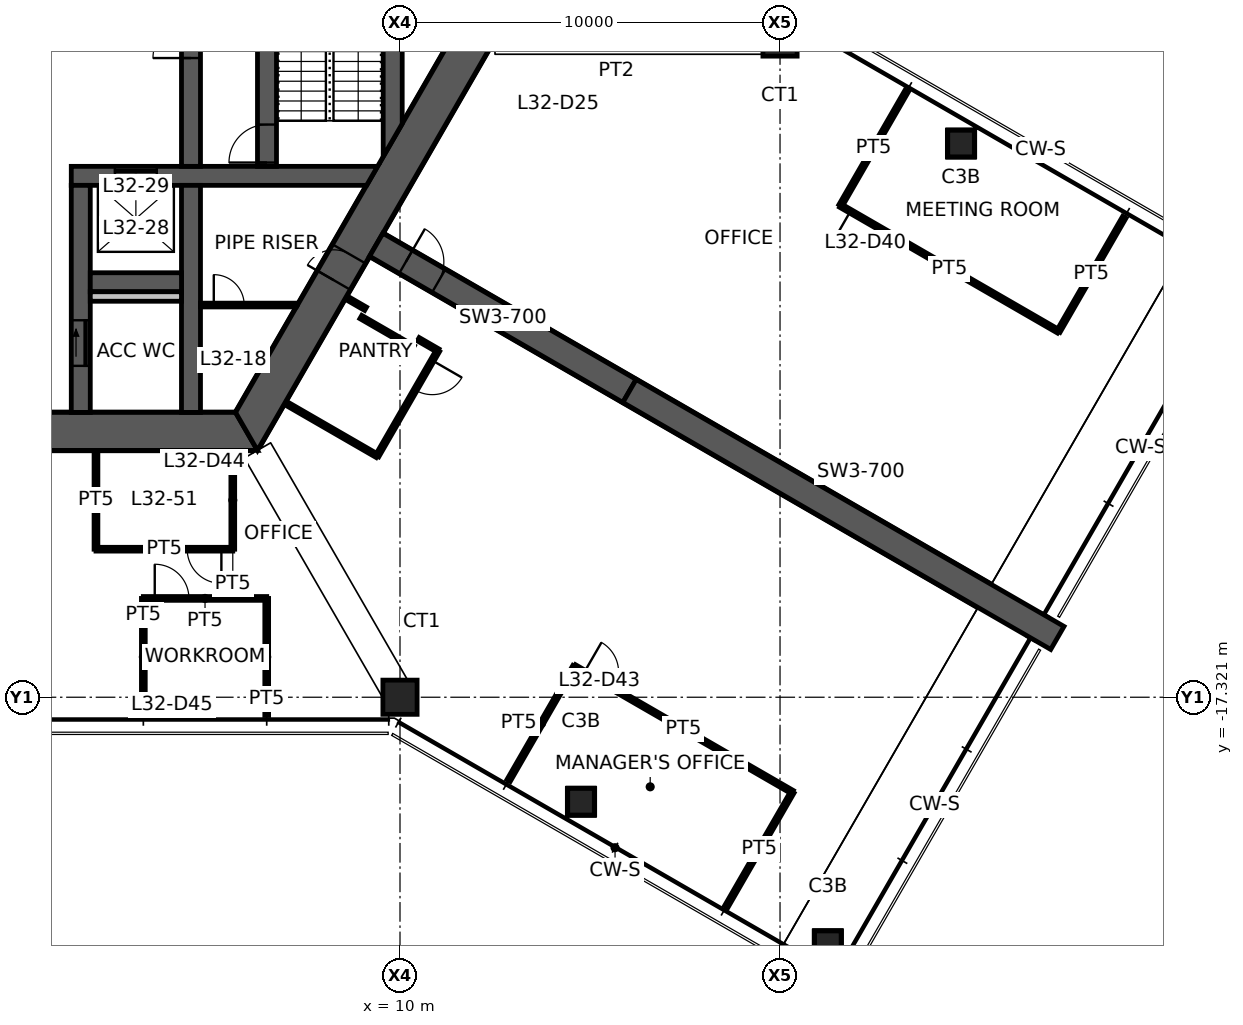
"""IFC4 building model, lengths in metres.
Left out: names, types, materials, properties, quantities, classifications, styles, units other than length and angle.
Written with IfcOpenShell. Run it as: python <this file> out.ifc"""

import sys

from ifc_helpers import new_model, si_unit, direction, frame, frame_2d, origin, origin_2d, place, context, subcontext, project, spatial, polyline, rectangle, hollow_rectangle, outline, extrude, element, fill, save


model = new_model("IFC4")
c1 = context("Model", 3, precision=1e-05, world=origin(), true_north=direction((0.0, 1.0)))
c2 = subcontext(c1, "Body", "Model", "MODEL_VIEW")
j1 = project(units=[si_unit("LENGTHUNIT", "METRE"), si_unit("PLANEANGLEUNIT", "RADIAN")], contexts=[c1])
p1 = place(None, origin())
s1 = spatial("IfcSite", under=j1, at=p1, CompositionType="ELEMENT")
p2 = place(p1, origin())
s2 = spatial("IfcBuilding", under=s1, at=p2, CompositionType="ELEMENT")
p3 = place(p2, frame((0.0, 0.0, 128.6)))
s3 = spatial("IfcBuildingStorey", under=s2, at=p3, CompositionType="ELEMENT", Elevation=128.6)
for number, where, z_axis, x_axis in (
    (1, (20.0, 0.0, 0.0), (0.0, 0.0, 1.0), (1.0, 0.0, 0.0)),
    (2, (10.0, -17.321, 0.0), (0.0, 0.0, 1.0), (1.0, 0.0, 0.0)),
):
    element("IfcColumn", number, at=place(p3, frame(where, z_axis=z_axis, x_axis=x_axis)), inside=s3, PredefinedType="COLUMN", context=c2, shape_type="SweptSolid", body=[
        extrude(hollow_rectangle(XDim=0.9, YDim=0.9, WallThickness=0.07, at=origin_2d()), origin(), (0.0, 0.0, 1.0), 4.5),
    ])
for number, where, z_axis, x_axis in (
    (3, (14.763, -20.071, 0.0), (0.0, 0.0, 1.0), (1.0, 0.0, 0.0)),
    (4, (21.258, -23.821, 0.0), (0.0, 0.0, 1.0), (1.0, 0.0, 0.0)),
    (5, (24.763, -2.75, 0.0), (0.0, 0.0, 1.0), (1.0, 0.0, 0.0)),
):
    element("IfcColumn", number, at=place(p3, frame(where, z_axis=z_axis, x_axis=x_axis)), inside=s3, PredefinedType="COLUMN", context=c2, shape_type="SweptSolid", body=[
        extrude(hollow_rectangle(XDim=0.7, YDim=0.7, WallThickness=0.036, at=origin_2d()), origin(), (0.0, 0.0, 1.0), 4.5),
    ])
p4 = place(p3, frame((-5.961, -10.325, 0.0), z_axis=(0.0, 0.0, 1.0), x_axis=(1.0, 0.0, 0.0)))
e6 = element("IfcWall", 6, at=p4, inside=s3, PredefinedType="SHEAR", context=c2, shape_type="SweptSolid", body=[
    extrude(outline(polyline([(-0.289, -0.5), (5.461, -0.5), (6.461, -0.5), (12.211, -0.5), (11.634, 0.5), (6.461, 0.5), (5.461, 0.5), (0.289, 0.5), (-0.289, -0.5)])), origin(), (0.0, 0.0, 1.0), 4.5),
])
p5 = place(p4, frame((5.461, 0.0, 0.0)))
e7 = element("IfcOpeningElement", 7, at=p5, cuts=e6, PredefinedType="OPENING", context=c2, shape_type="SweptSolid", body=[
    extrude(rectangle(XDim=1.0, YDim=2.1, at=frame_2d((0.5, 1.05))), frame((0.0, 0.51, 0.0), z_axis=(0.0, -1.0, 0.0), x_axis=(1.0, 0.0, 0.0)), (0.0, 0.0, 1.0), 1.02),
])
p6 = place(p3, frame((5.961, -10.325, 0.0), z_axis=(0.0, 0.0, 1.0), x_axis=(0.500004296715, 0.866022923061, 0.0)))
e8 = element("IfcWall", 8, at=p6, inside=s3, PredefinedType="SHEAR", context=c2, shape_type="SweptSolid", body=[
    extrude(outline(polyline([(-0.289, -0.5), (4.594, -0.5), (5.394, -0.5), (12.211, -0.5), (11.634, 0.5), (5.394, 0.5), (4.594, 0.5), (0.289, 0.5), (-0.289, -0.5)])), origin(), (0.0, 0.0, 1.0), 4.5),
])
p7 = place(p6, frame((4.594, 0.0, 0.0)))
e9 = element("IfcOpeningElement", 9, at=p7, cuts=e8, PredefinedType="OPENING", context=c2, shape_type="SweptSolid", body=[
    extrude(rectangle(XDim=0.8, YDim=2.1, at=frame_2d((0.4, 1.05))), frame((0.0, 0.51, 0.0), z_axis=(0.0, -1.0, 0.0), x_axis=(1.0, 0.0, 0.0)), (0.0, 0.0, 1.0), 1.02),
])
p8 = place(p3, frame((9.375, -5.413, 0.0), z_axis=(0.0, 0.0, 1.0), x_axis=(0.866032377459, -0.499987921047, 0.0)))
e10 = element("IfcWall", 10, at=p8, inside=s3, PredefinedType="SHEAR", context=c2, shape_type="SweptSolid", body=[
    extrude(rectangle(XDim=7.696, YDim=0.7, at=frame_2d((3.848, 0.0))), origin(), (0.0, 0.0, 1.0), 4.5),
])
p9 = place(p8, frame((0.9, 0.0, 0.0)))
e11 = element("IfcOpeningElement", 11, at=p9, cuts=e10, PredefinedType="OPENING", context=c2, shape_type="SweptSolid", body=[
    extrude(rectangle(XDim=1.0, YDim=2.1, at=frame_2d((0.5, 1.05))), frame((0.0, 0.36, 0.0), z_axis=(0.0, -1.0, 0.0), x_axis=(1.0, 0.0, 0.0)), (0.0, 0.0, 1.0), 0.72),
])
p10 = place(p3, frame((16.039, -9.26, 0.0), z_axis=(0.0, 0.0, 1.0), x_axis=(0.866024837091, -0.50000098154, 0.0)))
e12 = element("IfcWall", 12, at=p10, inside=s3, PredefinedType="SHEAR", context=c2, shape_type="SweptSolid", body=[
    extrude(rectangle(XDim=13.0, YDim=0.7, at=frame_2d((6.5, 0.0))), origin(), (0.0, 0.0, 1.0), 4.5),
])
p11 = place(p3, frame((1.35, -3.6, 0.0), z_axis=(0.0, 0.0, 1.0), x_axis=(1.0, 0.0, 0.0)))
e13 = element("IfcWall", 13, at=p11, inside=s3, PredefinedType="SHEAR", context=c2, shape_type="SweptSolid", body=[
    extrude(outline(polyline([(0.0, -0.25), (1.15, -0.25), (2.25, -0.25), (7.772, -0.25), (8.061, 0.25), (2.25, 0.25), (1.15, 0.25), (0.0, 0.25), (0.0, -0.25)])), origin(), (0.0, 0.0, 1.0), 4.5),
])
p12 = place(p11, frame((1.15, 0.0, 0.0)))
e14 = element("IfcOpeningElement", 14, at=p12, cuts=e13, PredefinedType="OPENING", context=c2, shape_type="SweptSolid", body=[
    extrude(rectangle(XDim=1.1, YDim=2.1, at=frame_2d((0.55, 1.05))), frame((0.0, 0.26, 0.0), z_axis=(0.0, -1.0, 0.0), x_axis=(1.0, 0.0, 0.0)), (0.0, 0.0, 1.0), 0.52),
])
p13 = place(p3, frame((1.6, -3.85, 0.0), z_axis=(0.0, 0.0, 1.0), x_axis=(0.0, -1.0, 0.0)))
e15 = element("IfcWall", 15, at=p13, inside=s3, PredefinedType="SHEAR", context=c2, shape_type="SweptSolid", body=[
    extrude(rectangle(XDim=5.975, YDim=0.5, at=frame_2d((2.987, 0.0))), origin(), (0.0, 0.0, 1.0), 4.5),
])
p14 = place(p13, frame((3.55, 0.0, 0.0)))
e16 = element("IfcOpeningElement", 16, at=p14, cuts=e15, PredefinedType="OPENING", context=c2, shape_type="SweptSolid", body=[
    extrude(rectangle(XDim=1.2, YDim=2.1, at=frame_2d((0.6, 1.05))), frame((0.0, 0.26, 0.0), z_axis=(0.0, -1.0, 0.0), x_axis=(1.0, 0.0, 0.0)), (0.0, 0.0, 1.0), 0.52),
])
p15 = place(p3, frame((4.5, -3.35, 0.0), z_axis=(0.0, 0.0, 1.0), x_axis=(0.0, 1.0, 0.0)))
e17 = element("IfcWall", 17, at=p15, inside=s3, PredefinedType="SHEAR", context=c2, shape_type="SweptSolid", body=[
    extrude(rectangle(XDim=6.7, YDim=0.5, at=frame_2d((3.35, 0.0))), origin(), (0.0, 0.0, 1.0), 4.5),
])
p16 = place(p15, frame((2.85, 0.0, 0.0)))
e18 = element("IfcOpeningElement", 18, at=p16, cuts=e17, PredefinedType="OPENING", context=c2, shape_type="SweptSolid", body=[
    extrude(rectangle(XDim=1.0, YDim=2.1, at=frame_2d((0.5, 1.05))), frame((0.0, 0.26, 0.0), z_axis=(0.0, -1.0, 0.0), x_axis=(1.0, 0.0, 0.0)), (0.0, 0.0, 1.0), 0.52),
])
p17 = place(p3, frame((6.5, -3.35, 0.0), z_axis=(0.0, 0.0, 1.0), x_axis=(0.0, 1.0, 0.0)))
e19 = element("IfcWall", 19, at=p17, inside=s3, PredefinedType="SHEAR", context=c2, shape_type="SweptSolid", body=[
    extrude(rectangle(XDim=6.7, YDim=0.5, at=frame_2d((3.35, 0.0))), origin(), (0.0, 0.0, 1.0), 4.5),
])
p18 = place(p17, frame((0.1, 0.0, 0.0)))
e20 = element("IfcOpeningElement", 20, at=p18, cuts=e19, PredefinedType="OPENING", context=c2, shape_type="SweptSolid", body=[
    extrude(rectangle(XDim=1.0, YDim=2.1, at=frame_2d((0.5, 1.05))), frame((0.0, 0.26, 0.0), z_axis=(0.0, -1.0, 0.0), x_axis=(1.0, 0.0, 0.0)), (0.0, 0.0, 1.0), 0.52),
])
p19 = place(p3, frame((4.5, -3.85, 0.0), z_axis=(0.0, 0.0, 1.0), x_axis=(0.0, -1.0, 0.0)))
e21 = element("IfcWall", 21, at=p19, inside=s3, PredefinedType="SHEAR", context=c2, shape_type="SweptSolid", body=[
    extrude(rectangle(XDim=5.975, YDim=0.5, at=frame_2d((2.987, 0.0))), origin(), (0.0, 0.0, 1.0), 4.5),
])
p20 = place(p3, frame((1.85, -6.4, 0.0), z_axis=(0.0, 0.0, 1.0), x_axis=(1.0, 0.0, 0.0)))
e22 = element("IfcWall", 22, at=p20, inside=s3, PredefinedType="SHEAR", context=c2, shape_type="SweptSolid", body=[
    extrude(rectangle(XDim=2.4, YDim=0.5, at=frame_2d((1.2, 0.0))), origin(), (0.0, 0.0, 1.0), 4.5),
])
p21 = place(p3, frame((9.808, -2.662, 0.0), z_axis=(0.0, 0.0, 1.0), x_axis=(0.0, 1.0, 0.0)))
e23 = element("IfcWall", 23, at=p21, inside=s3, PredefinedType="SHEAR", context=c2, shape_type="SweptSolid", body=[
    extrude(outline(polyline([(0.433, -0.25), (4.892, -0.25), (5.758, 0.25), (-0.433, 0.25), (0.433, -0.25)])), origin(), (0.0, 0.0, 1.0), 4.5),
])
p22 = place(p3, frame((1.85, -6.775, 0.0), z_axis=(0.0, 0.0, 1.0), x_axis=(1.0, 0.0, 0.0)))
e24 = element("IfcWall", 24, at=p22, inside=s3, PredefinedType="PLUMBINGWALL", context=c2, shape_type="SweptSolid", body=[
    extrude(rectangle(XDim=2.4, YDim=0.25, at=frame_2d((1.2, 0.0))), origin(), (0.0, 0.0, 1.0), 4.5),
])
p23 = place(p3, frame((4.75, -7.0, 0.0), z_axis=(0.0, 0.0, 1.0), x_axis=(1.0, 0.0, 0.0)))
e25 = element("IfcWall", 25, at=p23, inside=s3, PredefinedType="PARTITIONING", context=c2, shape_type="SweptSolid", body=[
    extrude(outline(polyline([(0.0, -0.05), (0.35, -0.05), (1.15, -0.05), (2.525, -0.05), (2.553, 0.0), (2.559, 0.05), (1.15, 0.05), (0.35, 0.05), (0.0, 0.05), (0.0, -0.05)])), origin(), (0.0, 0.0, 1.0), 3.55),
])
p24 = place(p23, frame((0.35, 0.0, 0.0)))
e26 = element("IfcOpeningElement", 26, at=p24, cuts=e25, PredefinedType="OPENING", context=c2, shape_type="SweptSolid", body=[
    extrude(rectangle(XDim=0.8, YDim=2.1, at=frame_2d((0.4, 1.05))), frame((0.0, 0.06, 0.0), z_axis=(0.0, -1.0, 0.0), x_axis=(1.0, 0.0, 0.0)), (0.0, 0.0, 1.0), 0.12),
])
p25 = place(p3, frame((21.592, -4.383, 0.0), z_axis=(0.0, 0.0, 1.0), x_axis=(0.500009906705, 0.86601968407, 0.0)))
e27 = element("IfcWall", 27, at=p25, inside=s3, PredefinedType="PARTITIONING", context=c2, shape_type="SweptSolid", body=[
    extrude(rectangle(XDim=3.48, YDim=0.1, at=frame_2d((1.74, 0.0))), origin(), (0.0, 0.0, 1.0), 3.55),
])
p26 = place(p3, frame((27.325, -7.693, 0.0), z_axis=(0.0, 0.0, 1.0), x_axis=(-0.866021597574, 0.500006592492, 0.0)))
e28 = element("IfcWall", 28, at=p26, inside=s3, PredefinedType="PARTITIONING", context=c2, shape_type="SweptSolid", body=[
    extrude(rectangle(XDim=6.62, YDim=0.1, at=frame_2d((3.31, 0.0))), origin(), (0.0, 0.0, 1.0), 3.55),
])
p27 = place(p26, frame((5.42, 0.0, 0.0)))
e29 = element("IfcOpeningElement", 29, at=p27, cuts=e28, PredefinedType="OPENING", context=c2, shape_type="SweptSolid", body=[
    extrude(rectangle(XDim=0.9, YDim=2.1, at=frame_2d((0.45, 1.05))), frame((0.0, 0.06, 0.0), z_axis=(0.0, -1.0, 0.0), x_axis=(1.0, 0.0, 0.0)), (0.0, 0.0, 1.0), 0.12),
])
p28 = place(p3, frame((29.06, -4.688, 0.0), z_axis=(0.0, 0.0, 1.0), x_axis=(-0.500020871164, -0.866013353477, 0.0)))
e30 = element("IfcWall", 30, at=p28, inside=s3, PredefinedType="PARTITIONING", context=c2, shape_type="SweptSolid", body=[
    extrude(rectangle(XDim=3.47, YDim=0.1, at=frame_2d((1.735, 0.0))), origin(), (0.0, 0.0, 1.0), 3.55),
])
p29 = place(p3, frame((8.592, -6.808, 0.0), z_axis=(0.0, 0.0, 1.0), x_axis=(0.865954211699, -0.50012328804, 0.0)))
e31 = element("IfcWall", 31, at=p29, inside=s3, PredefinedType="PARTITIONING", context=c2, shape_type="SweptSolid", body=[
    extrude(rectangle(XDim=0.58, YDim=0.1, at=frame_2d((0.29, 0.0))), origin(), (0.0, 0.0, 1.0), 3.55),
])
p30 = place(p3, frame((8.969, -7.315, 0.0), z_axis=(0.0, 0.0, 1.0), x_axis=(0.866094119867, -0.499880961361, 0.0)))
e32 = element("IfcWall", 32, at=p30, inside=s3, PredefinedType="PARTITIONING", context=c2, shape_type="SweptSolid", body=[
    extrude(rectangle(XDim=1.6, YDim=0.1, at=frame_2d((0.8, 0.0))), origin(), (0.0, 0.0, 1.0), 3.55),
])
p31 = place(p3, frame((9.4, -10.969, 0.0), z_axis=(0.0, 0.0, 1.0), x_axis=(-0.866018876994, 0.500011304563, 0.0)))
e33 = element("IfcWall", 33, at=p31, inside=s3, PredefinedType="PARTITIONING", context=c2, shape_type="SweptSolid", body=[
    extrude(rectangle(XDim=2.78, YDim=0.1, at=frame_2d((1.39, 0.0))), origin(), (0.0, 0.0, 1.0), 3.55),
])
p32 = place(p3, frame((10.48, -7.898, 0.0), z_axis=(0.0, 0.0, 1.0), x_axis=(0.866131372301, -0.499816412211, 0.0)))
e34 = element("IfcWall", 34, at=p32, inside=s3, PredefinedType="PARTITIONING", context=c2, shape_type="SweptSolid", body=[
    extrude(rectangle(XDim=0.6, YDim=0.1, at=frame_2d((0.3, 0.0))), origin(), (0.0, 0.0, 1.0), 3.55),
])
p33 = place(p3, frame((11.0, -8.198, 0.0), z_axis=(0.0, 0.0, 1.0), x_axis=(-0.499938187974, -0.866061088033, 0.0)))
e35 = element("IfcWall", 35, at=p33, inside=s3, PredefinedType="PARTITIONING", context=c2, shape_type="SweptSolid", body=[
    extrude(rectangle(XDim=3.2, YDim=0.1, at=frame_2d((1.6, 0.0))), origin(), (0.0, 0.0, 1.0), 3.55),
])
p34 = place(p33, frame((0.3, 0.0, 0.0)))
e36 = element("IfcOpeningElement", 36, at=p34, cuts=e35, PredefinedType="OPENING", context=c2, shape_type="SweptSolid", body=[
    extrude(rectangle(XDim=0.9, YDim=2.1, at=frame_2d((0.45, 1.05))), frame((0.0, 0.06, 0.0), z_axis=(0.0, -1.0, 0.0), x_axis=(1.0, 0.0, 0.0)), (0.0, 0.0, 1.0), 0.12),
])
p35 = place(p3, frame((12.857, -19.513, 0.0), z_axis=(0.0, 0.0, 1.0), x_axis=(0.500051338648, 0.865995761373, 0.0)))
e37 = element("IfcWall", 37, at=p35, inside=s3, PredefinedType="PARTITIONING", context=c2, shape_type="SweptSolid", body=[
    extrude(rectangle(XDim=3.47, YDim=0.1, at=frame_2d((1.735, 0.0))), origin(), (0.0, 0.0, 1.0), 3.55),
])
p36 = place(p3, frame((14.592, -16.508, 0.0), z_axis=(0.0, 0.0, 1.0), x_axis=(0.866037567856, -0.499978930619, 0.0)))
e38 = element("IfcWall", 38, at=p36, inside=s3, PredefinedType="PARTITIONING", context=c2, shape_type="SweptSolid", body=[
    extrude(rectangle(XDim=6.619, YDim=0.1, at=frame_2d((3.31, 0.0))), origin(), (0.0, 0.0, 1.0), 3.55),
])
p37 = place(p36, frame((0.3, 0.0, 0.0)))
e39 = element("IfcOpeningElement", 39, at=p37, cuts=e38, PredefinedType="OPENING", context=c2, shape_type="SweptSolid", body=[
    extrude(rectangle(XDim=0.9, YDim=2.1, at=frame_2d((0.45, 1.05))), frame((0.0, 0.06, 0.0), z_axis=(0.0, -1.0, 0.0), x_axis=(1.0, 0.0, 0.0)), (0.0, 0.0, 1.0), 0.12),
])
p38 = place(p3, frame((20.325, -19.817, 0.0), z_axis=(0.0, 0.0, 1.0), x_axis=(-0.499979528911, -0.866037222451, 0.0)))
e40 = element("IfcWall", 40, at=p38, inside=s3, PredefinedType="PARTITIONING", context=c2, shape_type="SweptSolid", body=[
    extrude(rectangle(XDim=3.48, YDim=0.1, at=frame_2d((1.74, 0.0))), origin(), (0.0, 0.0, 1.0), 3.55),
])
p39 = place(p3, frame((2.0, -13.425, 0.0), z_axis=(0.0, 0.0, 1.0), x_axis=(0.0, 1.0, 0.0)))
e41 = element("IfcWall", 41, at=p39, inside=s3, PredefinedType="PARTITIONING", context=c2, shape_type="SweptSolid", body=[
    extrude(rectangle(XDim=2.58, YDim=0.1, at=frame_2d((1.29, 0.0))), origin(), (0.0, 0.0, 1.0), 3.55),
])
p40 = place(p3, frame((5.6, -13.425, 0.0), z_axis=(0.0, 0.0, 1.0), x_axis=(-1.0, 0.0, 0.0)))
e42 = element("IfcWall", 42, at=p40, inside=s3, PredefinedType="PARTITIONING", context=c2, shape_type="SweptSolid", body=[
    extrude(rectangle(XDim=3.6, YDim=0.1, at=frame_2d((1.8, 0.0))), origin(), (0.0, 0.0, 1.0), 3.55),
])
p41 = place(p40, frame((0.3, 0.0, 0.0)))
e43 = element("IfcOpeningElement", 43, at=p41, cuts=e42, PredefinedType="OPENING", context=c2, shape_type="SweptSolid", body=[
    extrude(rectangle(XDim=0.9, YDim=2.1, at=frame_2d((0.45, 1.05))), frame((0.0, 0.06, 0.0), z_axis=(0.0, -1.0, 0.0), x_axis=(1.0, 0.0, 0.0)), (0.0, 0.0, 1.0), 0.12),
])
p42 = place(p3, frame((5.6, -10.845, 0.0), z_axis=(0.0, 0.0, 1.0), x_axis=(0.0, -1.0, 0.0)))
e44 = element("IfcWall", 44, at=p42, inside=s3, PredefinedType="PARTITIONING", context=c2, shape_type="SweptSolid", body=[
    extrude(rectangle(XDim=2.58, YDim=0.1, at=frame_2d((1.29, 0.0))), origin(), (0.0, 0.0, 1.0), 3.55),
])
p43 = place(p3, frame((3.246, -17.801, 0.0), z_axis=(0.0, 0.0, 1.0), x_axis=(0.0, 1.0, 0.0)))
e45 = element("IfcWall", 45, at=p43, inside=s3, PredefinedType="PARTITIONING", context=c2, shape_type="SweptSolid", body=[
    extrude(rectangle(XDim=3.08, YDim=0.1, at=frame_2d((1.54, 0.0))), origin(), (0.0, 0.0, 1.0), 3.55),
])
p44 = place(p3, frame((3.246, -14.72, 0.0), z_axis=(0.0, 0.0, 1.0), x_axis=(1.0, 0.0, 0.0)))
e46 = element("IfcWall", 46, at=p44, inside=s3, PredefinedType="PARTITIONING", context=c2, shape_type="SweptSolid", body=[
    extrude(rectangle(XDim=3.247, YDim=0.1, at=frame_2d((1.623, 0.0))), origin(), (0.0, 0.0, 1.0), 3.55),
])
p45 = place(p44, frame((0.3, 0.0, 0.0)))
e47 = element("IfcOpeningElement", 47, at=p45, cuts=e46, PredefinedType="OPENING", context=c2, shape_type="SweptSolid", body=[
    extrude(rectangle(XDim=0.9, YDim=2.1, at=frame_2d((0.45, 1.05))), frame((0.0, 0.06, 0.0), z_axis=(0.0, -1.0, 0.0), x_axis=(1.0, 0.0, 0.0)), (0.0, 0.0, 1.0), 0.12),
])
p46 = place(p3, frame((6.493, -14.72, 0.0), z_axis=(0.0, 0.0, 1.0), x_axis=(0.0, -1.0, 0.0)))
e48 = element("IfcWall", 48, at=p46, inside=s3, PredefinedType="PARTITIONING", context=c2, shape_type="SweptSolid", body=[
    extrude(rectangle(XDim=3.08, YDim=0.1, at=frame_2d((1.54, 0.0))), origin(), (0.0, 0.0, 1.0), 3.55),
])
p47 = place(p7, origin())
e49 = element("IfcDoor", 49, at=p47, inside=s3, OperationType="SINGLE_SWING_LEFT", PredefinedType="DOOR", context=c2, shape_type="SweptSolid", body=[
    extrude(rectangle(XDim=0.8, YDim=2.1, at=frame_2d((0.4, 1.05))), frame((0.0, 0.025, 0.0), z_axis=(0.0, -1.0, 0.0), x_axis=(1.0, 0.0, 0.0)), (0.0, 0.0, 1.0), 0.05),
])
fill(e9, e49)
p48 = place(p16, origin())
e50 = element("IfcDoor", 50, at=p48, inside=s3, OperationType="SINGLE_SWING_LEFT", PredefinedType="DOOR", context=c2, shape_type="SweptSolid", body=[
    extrude(rectangle(XDim=1.0, YDim=2.1, at=frame_2d((0.5, 1.05))), frame((0.0, 0.025, 0.0), z_axis=(0.0, -1.0, 0.0), x_axis=(1.0, 0.0, 0.0)), (0.0, 0.0, 1.0), 0.05),
])
fill(e18, e50)
p49 = place(p18, origin())
e51 = element("IfcDoor", 51, at=p49, inside=s3, OperationType="SINGLE_SWING_LEFT", PredefinedType="DOOR", context=c2, shape_type="SweptSolid", body=[
    extrude(rectangle(XDim=1.0, YDim=2.1, at=frame_2d((0.5, 1.05))), frame((0.0, 0.025, 0.0), z_axis=(0.0, -1.0, 0.0), x_axis=(1.0, 0.0, 0.0)), (0.0, 0.0, 1.0), 0.05),
])
fill(e20, e51)
p50 = place(p14, origin())
e52 = element("IfcDoor", 52, at=p50, inside=s3, OperationType="SLIDING_TO_LEFT", PredefinedType="DOOR", context=c2, shape_type="SweptSolid", body=[
    extrude(rectangle(XDim=1.2, YDim=2.1, at=frame_2d((0.6, 1.05))), frame((0.0, 0.025, 0.0), z_axis=(0.0, -1.0, 0.0), x_axis=(1.0, 0.0, 0.0)), (0.0, 0.0, 1.0), 0.05),
])
fill(e16, e52)
p51 = place(p9, origin())
e53 = element("IfcDoor", 53, at=p51, inside=s3, OperationType="SINGLE_SWING_LEFT", PredefinedType="DOOR", context=c2, shape_type="SweptSolid", body=[
    extrude(rectangle(XDim=1.0, YDim=2.1, at=frame_2d((0.5, 1.05))), frame((0.0, 0.025, 0.0), z_axis=(0.0, -1.0, 0.0), x_axis=(1.0, 0.0, 0.0)), (0.0, 0.0, 1.0), 0.05),
])
fill(e11, e53)
p52 = place(p24, origin())
e54 = element("IfcDoor", 54, at=p52, inside=s3, OperationType="SINGLE_SWING_LEFT", PredefinedType="DOOR", context=c2, shape_type="SweptSolid", body=[
    extrude(rectangle(XDim=0.8, YDim=2.1, at=frame_2d((0.4, 1.05))), frame((0.0, 0.025, 0.0), z_axis=(0.0, -1.0, 0.0), x_axis=(1.0, 0.0, 0.0)), (0.0, 0.0, 1.0), 0.05),
])
fill(e26, e54)
p53 = place(p27, origin())
e55 = element("IfcDoor", 55, at=p53, inside=s3, OperationType="SINGLE_SWING_RIGHT", PredefinedType="DOOR", context=c2, shape_type="SweptSolid", body=[
    extrude(rectangle(XDim=0.9, YDim=2.1, at=frame_2d((0.45, 1.05))), frame((0.0, 0.025, 0.0), z_axis=(0.0, -1.0, 0.0), x_axis=(1.0, 0.0, 0.0)), (0.0, 0.0, 1.0), 0.05),
])
fill(e29, e55)
p54 = place(p34, origin())
e56 = element("IfcDoor", 56, at=p54, inside=s3, OperationType="SINGLE_SWING_LEFT", PredefinedType="DOOR", context=c2, shape_type="SweptSolid", body=[
    extrude(rectangle(XDim=0.9, YDim=2.1, at=frame_2d((0.45, 1.05))), frame((0.0, 0.025, 0.0), z_axis=(0.0, -1.0, 0.0), x_axis=(1.0, 0.0, 0.0)), (0.0, 0.0, 1.0), 0.05),
])
fill(e36, e56)
p55 = place(p37, origin())
e57 = element("IfcDoor", 57, at=p55, inside=s3, OperationType="SINGLE_SWING_LEFT", PredefinedType="DOOR", context=c2, shape_type="SweptSolid", body=[
    extrude(rectangle(XDim=0.9, YDim=2.1, at=frame_2d((0.45, 1.05))), frame((0.0, 0.025, 0.0), z_axis=(0.0, -1.0, 0.0), x_axis=(1.0, 0.0, 0.0)), (0.0, 0.0, 1.0), 0.05),
])
fill(e39, e57)
p56 = place(p41, origin())
e58 = element("IfcDoor", 58, at=p56, inside=s3, OperationType="SINGLE_SWING_LEFT", PredefinedType="DOOR", context=c2, shape_type="SweptSolid", body=[
    extrude(rectangle(XDim=0.9, YDim=2.1, at=frame_2d((0.45, 1.05))), frame((0.0, 0.025, 0.0), z_axis=(0.0, -1.0, 0.0), x_axis=(1.0, 0.0, 0.0)), (0.0, 0.0, 1.0), 0.05),
])
fill(e43, e58)
p57 = place(p45, origin())
e59 = element("IfcDoor", 59, at=p57, inside=s3, OperationType="SINGLE_SWING_LEFT", PredefinedType="DOOR", context=c2, shape_type="SweptSolid", body=[
    extrude(rectangle(XDim=0.9, YDim=2.1, at=frame_2d((0.45, 1.05))), frame((0.0, 0.025, 0.0), z_axis=(0.0, -1.0, 0.0), x_axis=(1.0, 0.0, 0.0)), (0.0, 0.0, 1.0), 0.05),
])
fill(e47, e59)
p58 = place(p12, origin())
e60 = element("IfcDoor", 60, at=p58, inside=s3, OperationType="DOUBLE_DOOR_SLIDING", PredefinedType="DOOR", context=c2, shape_type="SweptSolid", body=[
    extrude(rectangle(XDim=1.1, YDim=2.1, at=frame_2d((0.55, 1.05))), frame((0.0, 0.025, 0.0), z_axis=(0.0, -1.0, 0.0), x_axis=(1.0, 0.0, 0.0)), (0.0, 0.0, 1.0), 0.05),
])
fill(e14, e60)
save(model, sys.argv[1])
